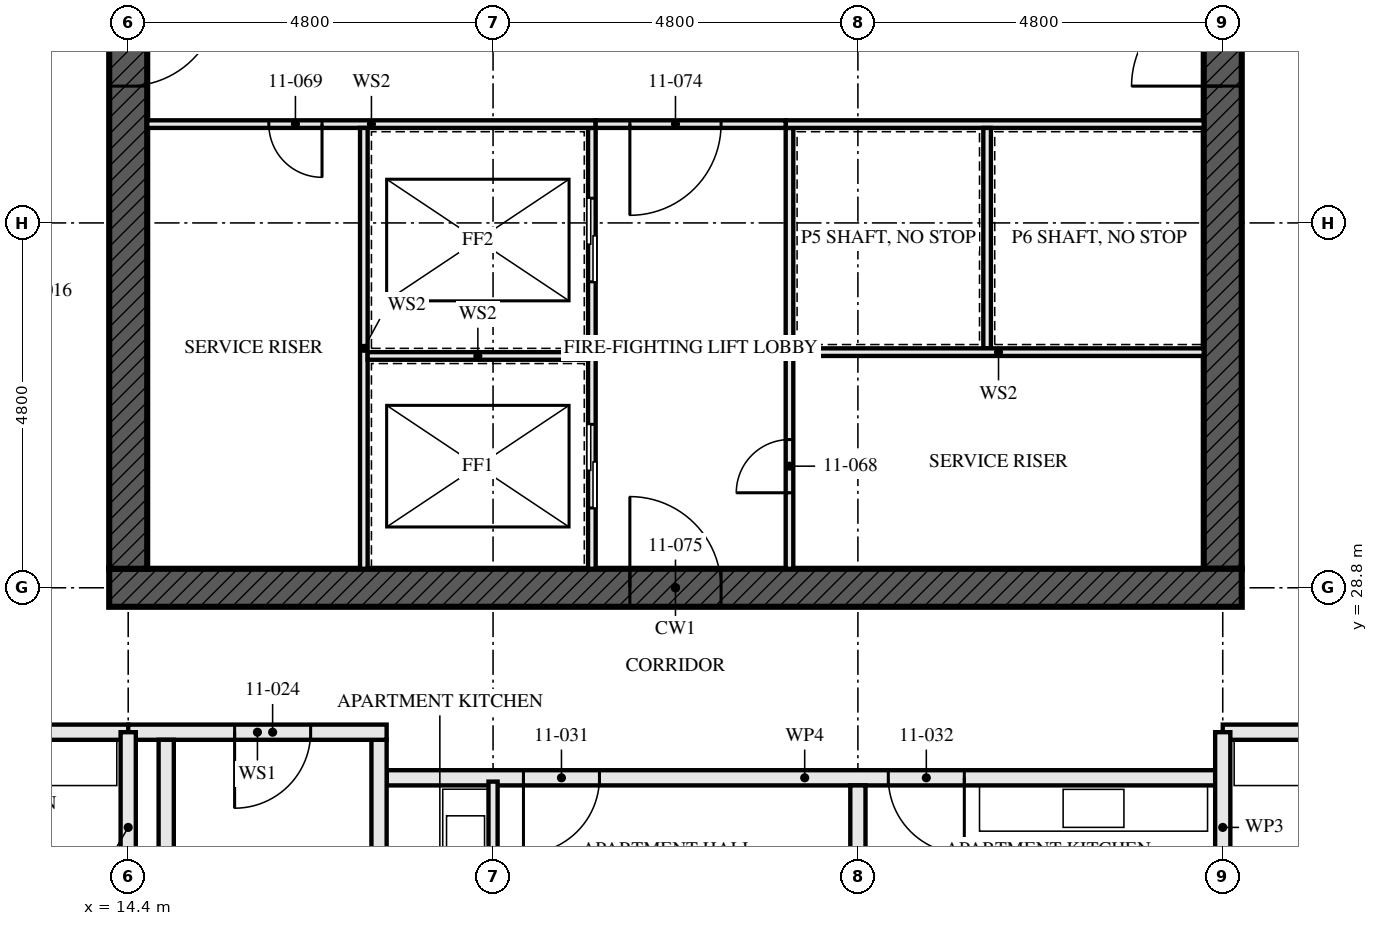
"""IFC4 building model, lengths in metres.
Left out: names, types, materials, properties, quantities, classifications, styles, units other than length and angle.
Written with IfcOpenShell. Run it as: python <this file> out.ifc"""

import sys

from ifc_helpers import new_model, si_unit, direction, frame, frame_2d, origin, place, context, subcontext, project, spatial, rectangle, extrude, element, fill, save


model = new_model("IFC4")
c1 = context("Model", 3, precision=1e-05, world=origin(), true_north=direction((0.0, 1.0)))
c2 = subcontext(c1, "Body", "Model", "MODEL_VIEW")
j1 = project(units=[si_unit("LENGTHUNIT", "METRE"), si_unit("PLANEANGLEUNIT", "RADIAN")], contexts=[c1])
p1 = place(None, origin())
s1 = spatial("IfcSite", under=j1, at=p1, CompositionType="ELEMENT")
p2 = place(p1, origin())
s2 = spatial("IfcBuilding", under=s1, at=p2, CompositionType="ELEMENT")
p3 = place(p2, frame((0.0, 0.0, 44.5)))
s3 = spatial("IfcBuildingStorey", under=s2, at=p3, CompositionType="ELEMENT", Elevation=44.5)
p4 = place(p3, frame((14.15, 28.8, -0.17), z_axis=(0.0, 0.0, 1.0), x_axis=(1.0, 0.0, 0.0)))
e1 = element("IfcWall", 1, at=p4, inside=s3, PredefinedType="SHEAR", context=c2, shape_type="SweptSolid", body=[
    extrude(rectangle(XDim=14.9, YDim=0.5, at=frame_2d((7.45, 0.0))), origin(), (0.0, 0.0, 1.0), 3.5),
])
p5 = place(p4, frame((6.85, 0.0, 0.17)))
e2 = element("IfcOpeningElement", 2, at=p5, cuts=e1, PredefinedType="OPENING", context=c2, shape_type="SweptSolid", body=[
    extrude(rectangle(XDim=1.2, YDim=2.1, at=frame_2d((0.6, 1.05))), frame((0.0, 0.26, 0.0), z_axis=(0.0, -1.0, 0.0), x_axis=(1.0, 0.0, 0.0)), (0.0, 0.0, 1.0), 0.521),
])
p6 = place(p3, frame((14.4, 42.95, -0.17), z_axis=(0.0, 0.0, 1.0), x_axis=(0.0, -1.0, 0.0)))
e3 = element("IfcWall", 3, at=p6, inside=s3, PredefinedType="SHEAR", context=c2, shape_type="SweptSolid", body=[
    extrude(rectangle(XDim=13.9, YDim=0.5, at=frame_2d((6.95, 0.0))), origin(), (0.0, 0.0, 1.0), 3.5),
])
p7 = place(p6, frame((6.35, 0.0, 0.17)))
e4 = element("IfcOpeningElement", 4, at=p7, cuts=e3, PredefinedType="OPENING", context=c2, shape_type="SweptSolid", body=[
    extrude(rectangle(XDim=1.2, YDim=2.1, at=frame_2d((0.6, 1.05))), frame((0.0, 0.26, 0.0), z_axis=(0.0, -1.0, 0.0), x_axis=(1.0, 0.0, 0.0)), (0.0, 0.0, 1.0), 0.521),
])
p8 = place(p3, frame((28.8, 29.05, -0.17), z_axis=(0.0, 0.0, 1.0), x_axis=(0.0, 1.0, 0.0)))
e5 = element("IfcWall", 5, at=p8, inside=s3, PredefinedType="SHEAR", context=c2, shape_type="SweptSolid", body=[
    extrude(rectangle(XDim=13.9, YDim=0.5, at=frame_2d((6.95, 0.0))), origin(), (0.0, 0.0, 1.0), 3.5),
])
p9 = place(p8, frame((6.35, 0.0, 0.17)))
e6 = element("IfcOpeningElement", 6, at=p9, cuts=e5, PredefinedType="OPENING", context=c2, shape_type="SweptSolid", body=[
    extrude(rectangle(XDim=1.2, YDim=2.1, at=frame_2d((0.6, 1.05))), frame((0.0, 0.26, 0.0), z_axis=(0.0, -1.0, 0.0), x_axis=(1.0, 0.0, 0.0)), (0.0, 0.0, 1.0), 0.521),
])
p10 = place(p3, frame((4.8, 26.9, 0.0), z_axis=(0.0, 0.0, 1.0), x_axis=(1.0, 0.0, 0.0)))
e7 = element("IfcWall", 7, at=p10, inside=s3, PredefinedType="PARTITIONING", context=c2, shape_type="SweptSolid", body=[
    extrude(rectangle(XDim=9.6, YDim=0.2, at=frame_2d((4.8, 0.0))), origin(), (0.0, 0.0, 1.0), 3.33),
])
p11 = place(p10, frame((0.4, 0.0, 0.0)))
e8 = element("IfcOpeningElement", 8, at=p11, cuts=e7, PredefinedType="OPENING", context=c2, shape_type="SweptSolid", body=[
    extrude(rectangle(XDim=1.0, YDim=2.1, at=frame_2d((0.5, 1.05))), frame((0.0, 0.111, 0.0), z_axis=(0.0, -1.0, 0.0), x_axis=(1.0, 0.0, 0.0)), (0.0, 0.0, 1.0), 0.221),
])
p12 = place(p10, frame((5.2, 0.0, 0.0)))
e9 = element("IfcOpeningElement", 9, at=p12, cuts=e7, PredefinedType="OPENING", context=c2, shape_type="SweptSolid", body=[
    extrude(rectangle(XDim=1.0, YDim=2.1, at=frame_2d((0.5, 1.05))), frame((0.0, 0.111, 0.0), z_axis=(0.0, -1.0, 0.0), x_axis=(1.0, 0.0, 0.0)), (0.0, 0.0, 1.0), 0.221),
])
for number, where, z_axis, x_axis in (
    (10, (14.9, 22.1, 0.0), (0.0, 0.0, 1.0), (0.0, 1.0, 0.0)),
    (11, (17.7, 22.1, 0.0), (0.0, 0.0, 1.0), (0.0, 1.0, 0.0)),
):
    element("IfcWall", number, at=place(p3, frame(where, z_axis=z_axis, x_axis=x_axis)), inside=s3, PredefinedType="SOLIDWALL", context=c2, shape_type="SweptSolid", body=[
        extrude(rectangle(XDim=4.7, YDim=0.2, at=frame_2d((2.35, 0.0))), origin(), (0.0, 0.0, 1.0), 2.99),
    ])
p13 = place(p3, frame((14.4, 26.9, 0.0), z_axis=(0.0, 0.0, 1.0), x_axis=(1.0, 0.0, 0.0)))
e12 = element("IfcWall", 12, at=p13, inside=s3, PredefinedType="SOLIDWALL", context=c2, shape_type="SweptSolid", body=[
    extrude(rectangle(XDim=3.4, YDim=0.2, at=frame_2d((1.7, 0.0))), origin(), (0.0, 0.0, 1.0), 3.33),
])
p14 = place(p13, frame((1.4, 0.0, 0.0)))
e13 = element("IfcOpeningElement", 13, at=p14, cuts=e12, PredefinedType="OPENING", context=c2, shape_type="SweptSolid", body=[
    extrude(rectangle(XDim=1.0, YDim=2.1, at=frame_2d((0.5, 1.05))), frame((0.0, 0.111, 0.0), z_axis=(0.0, -1.0, 0.0), x_axis=(1.0, 0.0, 0.0)), (0.0, 0.0, 1.0), 0.221),
])
p15 = place(p3, frame((19.2, 21.6, 0.0), z_axis=(0.0, 0.0, 1.0), x_axis=(0.0, 1.0, 0.0)))
e14 = element("IfcWall", 14, at=p15, inside=s3, PredefinedType="PARTITIONING", context=c2, shape_type="SweptSolid", body=[
    extrude(rectangle(XDim=4.65, YDim=0.12, at=frame_2d((2.325, 0.0))), origin(), (0.0, 0.0, 1.0), 2.55),
])
p16 = place(p15, frame((1.875, 0.0, 0.0)))
e15 = element("IfcOpeningElement", 15, at=p16, cuts=e14, PredefinedType="OPENING", context=c2, shape_type="SweptSolid", body=[
    extrude(rectangle(XDim=0.9, YDim=2.1, at=frame_2d((0.45, 1.05))), frame((0.0, 0.071, 0.0), z_axis=(0.0, -1.0, 0.0), x_axis=(1.0, 0.0, 0.0)), (0.0, 0.0, 1.0), 0.141),
])
p17 = place(p3, frame((24.0, 14.795, 0.0), z_axis=(0.0, 0.0, 1.0), x_axis=(0.0, 1.0, 0.0)))
e16 = element("IfcWall", 16, at=p17, inside=s3, PredefinedType="PARTITIONING", context=c2, shape_type="SweptSolid", body=[
    extrude(rectangle(XDim=11.405, YDim=0.2, at=frame_2d((5.703, 0.0))), origin(), (0.0, 0.0, 1.0), 2.55),
])
p18 = place(p3, frame((17.8, 26.3, 0.0), z_axis=(0.0, 0.0, 1.0), x_axis=(1.0, 0.0, 0.0)))
e17 = element("IfcWall", 17, at=p18, inside=s3, PredefinedType="PARTITIONING", context=c2, shape_type="SweptSolid", body=[
    extrude(rectangle(XDim=11.0, YDim=0.2, at=frame_2d((5.5, 0.0))), origin(), (0.0, 0.0, 1.0), 2.55),
])
p19 = place(p18, frame((1.8, 0.0, 0.0)))
e18 = element("IfcOpeningElement", 18, at=p19, cuts=e17, PredefinedType="OPENING", context=c2, shape_type="SweptSolid", body=[
    extrude(rectangle(XDim=1.0, YDim=2.1, at=frame_2d((0.5, 1.05))), frame((0.0, 0.111, 0.0), z_axis=(0.0, -1.0, 0.0), x_axis=(1.0, 0.0, 0.0)), (0.0, 0.0, 1.0), 0.221),
])
p20 = place(p18, frame((6.6, 0.0, 0.0)))
e19 = element("IfcOpeningElement", 19, at=p20, cuts=e17, PredefinedType="OPENING", context=c2, shape_type="SweptSolid", body=[
    extrude(rectangle(XDim=1.0, YDim=2.1, at=frame_2d((0.5, 1.05))), frame((0.0, 0.111, 0.0), z_axis=(0.0, -1.0, 0.0), x_axis=(1.0, 0.0, 0.0)), (0.0, 0.0, 1.0), 0.221),
])
p21 = place(p3, frame((28.8, 26.9, 0.0), z_axis=(0.0, 0.0, 1.0), x_axis=(1.0, 0.0, 0.0)))
e20 = element("IfcWall", 20, at=p21, inside=s3, PredefinedType="PARTITIONING", context=c2, shape_type="SweptSolid", body=[
    extrude(rectangle(XDim=9.6, YDim=0.2, at=frame_2d((4.8, 0.0))), origin(), (0.0, 0.0, 1.0), 3.33),
])
p22 = place(p21, frame((5.2, 0.0, 0.0)))
e21 = element("IfcOpeningElement", 21, at=p22, cuts=e20, PredefinedType="OPENING", context=c2, shape_type="SweptSolid", body=[
    extrude(rectangle(XDim=1.0, YDim=2.1, at=frame_2d((0.5, 1.05))), frame((0.0, 0.111, 0.0), z_axis=(0.0, -1.0, 0.0), x_axis=(1.0, 0.0, 0.0)), (0.0, 0.0, 1.0), 0.221),
])
p23 = place(p3, frame((20.5, 29.05, 0.0), z_axis=(0.0, 0.0, 1.0), x_axis=(0.0, 1.0, 0.0)))
e22 = element("IfcWall", 22, at=p23, inside=s3, PredefinedType="SOLIDWALL", context=c2, shape_type="SweptSolid", body=[
    extrude(rectangle(XDim=5.8, YDim=0.1, at=frame_2d((2.9, 0.0))), origin(), (0.0, 0.0, 1.0), 3.33),
])
p24 = place(p23, frame((0.8, 0.0, 0.0)))
e23 = element("IfcOpeningElement", 23, at=p24, cuts=e22, PredefinedType="OPENING", context=c2, shape_type="SweptSolid", body=[
    extrude(rectangle(XDim=1.1, YDim=2.3, at=frame_2d((0.55, 1.15))), frame((0.0, 0.061, 0.0), z_axis=(0.0, -1.0, 0.0), x_axis=(1.0, 0.0, 0.0)), (0.0, 0.0, 1.0), 0.121),
])
p25 = place(p23, frame((3.775, 0.0, 0.0)))
e24 = element("IfcOpeningElement", 24, at=p25, cuts=e22, PredefinedType="OPENING", context=c2, shape_type="SweptSolid", body=[
    extrude(rectangle(XDim=1.1, YDim=2.3, at=frame_2d((0.55, 1.15))), frame((0.0, 0.061, 0.0), z_axis=(0.0, -1.0, 0.0), x_axis=(1.0, 0.0, 0.0)), (0.0, 0.0, 1.0), 0.121),
])
p26 = place(p3, frame((23.1, 29.05, 0.0), z_axis=(0.0, 0.0, 1.0), x_axis=(0.0, 1.0, 0.0)))
e25 = element("IfcWall", 25, at=p26, inside=s3, PredefinedType="SOLIDWALL", context=c2, shape_type="SweptSolid", body=[
    extrude(rectangle(XDim=5.8, YDim=0.1, at=frame_2d((2.9, 0.0))), origin(), (0.0, 0.0, 1.0), 3.33),
])
p27 = place(p26, frame((1.0, 0.0, 0.0)))
e26 = element("IfcOpeningElement", 26, at=p27, cuts=e25, PredefinedType="OPENING", context=c2, shape_type="SweptSolid", body=[
    extrude(rectangle(XDim=0.7, YDim=2.1, at=frame_2d((0.35, 1.05))), frame((0.0, 0.061, 0.0), z_axis=(0.0, -1.0, 0.0), x_axis=(1.0, 0.0, 0.0)), (0.0, 0.0, 1.0), 0.121),
])
p28 = place(p3, frame((14.65, 34.9, 0.0), z_axis=(0.0, 0.0, 1.0), x_axis=(1.0, 0.0, 0.0)))
e27 = element("IfcWall", 27, at=p28, inside=s3, PredefinedType="SOLIDWALL", context=c2, shape_type="SweptSolid", body=[
    extrude(rectangle(XDim=5.9, YDim=0.1, at=frame_2d((2.95, 0.0))), origin(), (0.0, 0.0, 1.0), 3.33),
])
p29 = place(p28, frame((1.6, 0.0, 0.0)))
e28 = element("IfcOpeningElement", 28, at=p29, cuts=e27, PredefinedType="OPENING", context=c2, shape_type="SweptSolid", body=[
    extrude(rectangle(XDim=0.7, YDim=2.1, at=frame_2d((0.35, 1.05))), frame((0.0, 0.061, 0.0), z_axis=(0.0, -1.0, 0.0), x_axis=(1.0, 0.0, 0.0)), (0.0, 0.0, 1.0), 0.121),
])
p30 = place(p3, frame((23.05, 34.9, 0.0), z_axis=(0.0, 0.0, 1.0), x_axis=(1.0, 0.0, 0.0)))
e29 = element("IfcWall", 29, at=p30, inside=s3, PredefinedType="SOLIDWALL", context=c2, shape_type="SweptSolid", body=[
    extrude(rectangle(XDim=5.5, YDim=0.1, at=frame_2d((2.75, 0.0))), origin(), (0.0, 0.0, 1.0), 3.33),
])
p31 = place(p3, frame((20.55, 34.9, 0.0), z_axis=(0.0, 0.0, 1.0), x_axis=(1.0, 0.0, 0.0)))
e30 = element("IfcWall", 30, at=p31, inside=s3, PredefinedType="SOLIDWALL", context=c2, shape_type="SweptSolid", body=[
    extrude(rectangle(XDim=2.5, YDim=0.1, at=frame_2d((1.25, 0.0))), origin(), (0.0, 0.0, 1.0), 3.33),
])
p32 = place(p31, frame((0.45, 0.0, 0.0)))
e31 = element("IfcOpeningElement", 31, at=p32, cuts=e30, PredefinedType="OPENING", context=c2, shape_type="SweptSolid", body=[
    extrude(rectangle(XDim=1.2, YDim=2.1, at=frame_2d((0.6, 1.05))), frame((0.0, 0.061, 0.0), z_axis=(0.0, -1.0, 0.0), x_axis=(1.0, 0.0, 0.0)), (0.0, 0.0, 1.0), 0.121),
])
p33 = place(p3, frame((17.5, 29.05, 0.0), z_axis=(0.0, 0.0, 1.0), x_axis=(0.0, 1.0, 0.0)))
e32 = element("IfcWall", 32, at=p33, inside=s3, PredefinedType="SOLIDWALL", context=c2, shape_type="SweptSolid", body=[
    extrude(rectangle(XDim=5.8, YDim=0.1, at=frame_2d((2.9, 0.0))), origin(), (0.0, 0.0, 1.0), 3.33),
])
p34 = place(p3, frame((17.55, 31.85, 0.0), z_axis=(0.0, 0.0, 1.0), x_axis=(1.0, 0.0, 0.0)))
e33 = element("IfcWall", 33, at=p34, inside=s3, PredefinedType="SOLIDWALL", context=c2, shape_type="SweptSolid", body=[
    extrude(rectangle(XDim=2.9, YDim=0.1, at=frame_2d((1.45, 0.0))), origin(), (0.0, 0.0, 1.0), 3.33),
])
p35 = place(p3, frame((25.7, 31.95, 0.0), z_axis=(0.0, 0.0, 1.0), x_axis=(0.0, 1.0, 0.0)))
e34 = element("IfcWall", 34, at=p35, inside=s3, PredefinedType="SOLIDWALL", context=c2, shape_type="SweptSolid", body=[
    extrude(rectangle(XDim=2.9, YDim=0.1, at=frame_2d((1.45, 0.0))), origin(), (0.0, 0.0, 1.0), 3.33),
])
p36 = place(p3, frame((23.15, 31.9, 0.0), z_axis=(0.0, 0.0, 1.0), x_axis=(1.0, 0.0, 0.0)))
e35 = element("IfcWall", 35, at=p36, inside=s3, PredefinedType="SOLIDWALL", context=c2, shape_type="SweptSolid", body=[
    extrude(rectangle(XDim=5.4, YDim=0.1, at=frame_2d((2.7, 0.0))), origin(), (0.0, 0.0, 1.0), 3.33),
])
for number, where, z_axis, x_axis in (
    (36, (14.4, 24.395, 0.0), (0.0, 0.0, 1.0), (0.0, 1.0, 0.0)),
    (37, (28.8, 24.395, 0.0), (0.0, 0.0, 1.0), (0.0, 1.0, 0.0)),
):
    element("IfcWall", number, at=place(p3, frame(where, z_axis=z_axis, x_axis=x_axis)), inside=s3, PredefinedType="PARTITIONING", context=c2, shape_type="SweptSolid", body=[
        extrude(rectangle(XDim=2.505, YDim=0.2, at=frame_2d((1.252, 0.0))), origin(), (0.0, 0.0, 1.0), 2.32),
    ])
p37 = place(p14, frame((1.0, 0.0, 0.0), z_axis=(0.0, 0.0, 1.0), x_axis=(-1.0, 0.0, 0.0)))
e38 = element("IfcDoor", 38, at=p37, inside=s3, OperationType="SINGLE_SWING_LEFT", PredefinedType="DOOR", context=c2, shape_type="SweptSolid", body=[
    extrude(rectangle(XDim=1.0, YDim=2.1, at=frame_2d((0.5, 1.05))), frame((0.0, 0.032, 0.0), z_axis=(0.0, -1.0, 0.0), x_axis=(1.0, 0.0, 0.0)), (0.0, 0.0, 1.0), 0.064),
])
fill(e13, e38)
p38 = place(p19, frame((1.0, 0.0, 0.0), z_axis=(0.0, 0.0, 1.0), x_axis=(-1.0, 0.0, 0.0)))
e39 = element("IfcDoor", 39, at=p38, inside=s3, OperationType="SINGLE_SWING_LEFT", PredefinedType="DOOR", context=c2, shape_type="SweptSolid", body=[
    extrude(rectangle(XDim=1.0, YDim=2.1, at=frame_2d((0.5, 1.05))), frame((0.0, 0.027, 0.0), z_axis=(0.0, -1.0, 0.0), x_axis=(1.0, 0.0, 0.0)), (0.0, 0.0, 1.0), 0.054),
])
fill(e18, e39)
p39 = place(p20, frame((1.0, 0.0, 0.0), z_axis=(0.0, 0.0, 1.0), x_axis=(-1.0, 0.0, 0.0)))
e40 = element("IfcDoor", 40, at=p39, inside=s3, OperationType="SINGLE_SWING_RIGHT", PredefinedType="DOOR", context=c2, shape_type="SweptSolid", body=[
    extrude(rectangle(XDim=1.0, YDim=2.1, at=frame_2d((0.5, 1.05))), frame((0.0, 0.027, 0.0), z_axis=(0.0, -1.0, 0.0), x_axis=(1.0, 0.0, 0.0)), (0.0, 0.0, 1.0), 0.054),
])
fill(e19, e40)
p40 = place(p24, origin())
e41 = element("IfcDoor", 41, at=p40, inside=s3, OperationType="SLIDING_TO_LEFT", PredefinedType="DOOR", context=c2, shape_type="SweptSolid", body=[
    extrude(rectangle(XDim=1.1, YDim=2.3, at=frame_2d((0.55, 1.15))), frame((0.0, 0.05, 0.0), z_axis=(0.0, -1.0, 0.0), x_axis=(1.0, 0.0, 0.0)), (0.0, 0.0, 1.0), 0.1),
])
fill(e23, e41)
p41 = place(p25, origin())
e42 = element("IfcDoor", 42, at=p41, inside=s3, OperationType="SLIDING_TO_LEFT", PredefinedType="DOOR", context=c2, shape_type="SweptSolid", body=[
    extrude(rectangle(XDim=1.1, YDim=2.3, at=frame_2d((0.55, 1.15))), frame((0.0, 0.05, 0.0), z_axis=(0.0, -1.0, 0.0), x_axis=(1.0, 0.0, 0.0)), (0.0, 0.0, 1.0), 0.1),
])
fill(e24, e42)
p42 = place(p27, origin())
e43 = element("IfcDoor", 43, at=p42, inside=s3, OperationType="SINGLE_SWING_RIGHT", PredefinedType="DOOR", context=c2, shape_type="SweptSolid", body=[
    extrude(rectangle(XDim=0.7, YDim=2.1, at=frame_2d((0.35, 1.05))), frame((0.0, 0.027, 0.0), z_axis=(0.0, -1.0, 0.0), x_axis=(1.0, 0.0, 0.0)), (0.0, 0.0, 1.0), 0.054),
])
fill(e26, e43)
p43 = place(p29, frame((0.7, 0.0, 0.0), z_axis=(0.0, 0.0, 1.0), x_axis=(-1.0, 0.0, 0.0)))
e44 = element("IfcDoor", 44, at=p43, inside=s3, OperationType="SINGLE_SWING_RIGHT", PredefinedType="DOOR", context=c2, shape_type="SweptSolid", body=[
    extrude(rectangle(XDim=0.7, YDim=2.1, at=frame_2d((0.35, 1.05))), frame((0.0, 0.027, 0.0), z_axis=(0.0, -1.0, 0.0), x_axis=(1.0, 0.0, 0.0)), (0.0, 0.0, 1.0), 0.054),
])
fill(e28, e44)
p44 = place(p32, frame((1.2, 0.0, 0.0), z_axis=(0.0, 0.0, 1.0), x_axis=(-1.0, 0.0, 0.0)))
e45 = element("IfcDoor", 45, at=p44, inside=s3, OperationType="SINGLE_SWING_LEFT", PredefinedType="DOOR", context=c2, shape_type="SweptSolid", body=[
    extrude(rectangle(XDim=1.2, YDim=2.1, at=frame_2d((0.6, 1.05))), frame((0.0, 0.027, 0.0), z_axis=(0.0, -1.0, 0.0), x_axis=(1.0, 0.0, 0.0)), (0.0, 0.0, 1.0), 0.054),
])
fill(e31, e45)
p45 = place(p5, origin())
e46 = element("IfcDoor", 46, at=p45, inside=s3, OperationType="SINGLE_SWING_LEFT", PredefinedType="DOOR", context=c2, shape_type="SweptSolid", body=[
    extrude(rectangle(XDim=1.2, YDim=2.1, at=frame_2d((0.6, 1.05))), frame((0.0, 0.027, 0.0), z_axis=(0.0, -1.0, 0.0), x_axis=(1.0, 0.0, 0.0)), (0.0, 0.0, 1.0), 0.054),
])
fill(e2, e46)
p46 = place(p7, origin())
e47 = element("IfcDoor", 47, at=p46, inside=s3, OperationType="SINGLE_SWING_LEFT", PredefinedType="DOOR", context=c2, shape_type="SweptSolid", body=[
    extrude(rectangle(XDim=1.2, YDim=2.1, at=frame_2d((0.6, 1.05))), frame((0.0, 0.027, 0.0), z_axis=(0.0, -1.0, 0.0), x_axis=(1.0, 0.0, 0.0)), (0.0, 0.0, 1.0), 0.054),
])
fill(e4, e47)
p47 = place(p9, origin())
e48 = element("IfcDoor", 48, at=p47, inside=s3, OperationType="SINGLE_SWING_LEFT", PredefinedType="DOOR", context=c2, shape_type="SweptSolid", body=[
    extrude(rectangle(XDim=1.2, YDim=2.1, at=frame_2d((0.6, 1.05))), frame((0.0, 0.027, 0.0), z_axis=(0.0, -1.0, 0.0), x_axis=(1.0, 0.0, 0.0)), (0.0, 0.0, 1.0), 0.054),
])
fill(e6, e48)
save(model, sys.argv[1])
